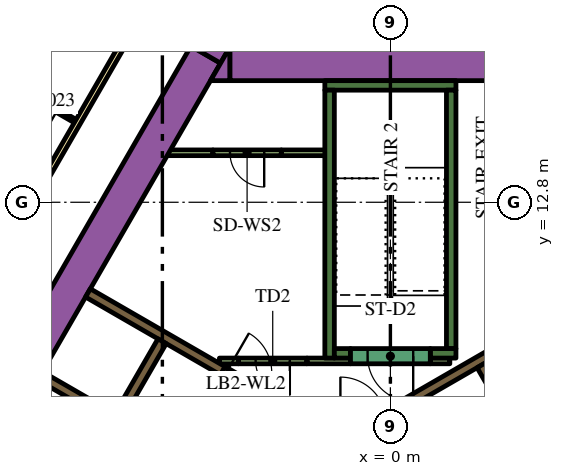
"""IFC4 building model, lengths in metres.
Left out: names, types, materials, properties, quantities, classifications, styles, units other than length and angle.
Written with IfcOpenShell. Run it as: python <this file> out.ifc"""

import sys

from ifc_helpers import new_model, si_unit, direction, frame, frame_2d, origin, place, context, subcontext, project, spatial, polyline, rectangle, outline, extrude, element, fill, save


model = new_model("IFC4")
c1 = context("Model", 3, precision=1e-05, world=origin(), true_north=direction((0.0, 1.0)))
c2 = subcontext(c1, "Body", "Model", "MODEL_VIEW")
j1 = project(units=[si_unit("LENGTHUNIT", "METRE"), si_unit("PLANEANGLEUNIT", "RADIAN")], contexts=[c1])
p1 = place(None, origin())
s1 = spatial("IfcSite", under=j1, at=p1, CompositionType="ELEMENT")
p2 = place(p1, origin())
s2 = spatial("IfcBuilding", under=s1, at=p2, CompositionType="ELEMENT")
p3 = place(p2, frame((0.0, 0.0, 130.5)))
s3 = spatial("IfcBuildingStorey", under=s2, at=p3, CompositionType="ELEMENT", Elevation=130.5)
p4 = place(p3, frame((-14.268, 0.387, 0.0), z_axis=(0.0, 0.0, 1.0), x_axis=(0.499994617707, 0.866028511231, 0.0)))
e1 = element("IfcWall", 1, at=p4, inside=s3, PredefinedType="SOLIDWALL", context=c2, shape_type="SweptSolid", body=[
    extrude(rectangle(XDim=18.817, YDim=0.9, at=frame_2d((9.409, 0.0))), origin(), (0.0, 0.0, 1.0), 3.9),
])
p5 = place(p3, origin())
e2 = element("IfcWall", 2, at=p5, inside=s3, PredefinedType="SOLIDWALL", context=c2, shape_type="SweptSolid", body=[
    extrude(outline(polyline([(-4.215, 16.9), (-4.469, 16.46), (-5.231, 16.9), (-4.215, 16.9)])), origin(), (0.0, 0.0, 1.0), 3.9),
])
p6 = place(p3, frame((-4.224, 16.45, 0.0), z_axis=(0.0, 0.0, 1.0), x_axis=(1.0, 0.0, 0.0)))
e3 = element("IfcWall", 3, at=p6, inside=s3, PredefinedType="SOLIDWALL", context=c2, shape_type="SweptSolid", body=[
    extrude(rectangle(XDim=9.488, YDim=0.9, at=frame_2d((4.744, 0.0))), origin(), (0.0, 0.0, 1.0), 3.9),
])
e4 = element("IfcWall", 4, at=p5, inside=s3, PredefinedType="SOLIDWALL", context=c2, shape_type="SweptSolid", body=[
    extrude(outline(polyline([(-4.734, 16.0), (-4.226, 16.88), (-4.226, 16.0), (-4.734, 16.0)])), origin(), (0.0, 0.0, 1.0), 3.9),
])
p7 = place(p3, frame((-1.725, 15.875, 0.0), z_axis=(0.0, 0.0, 1.0), x_axis=(1.0, 0.0, 0.0)))
e5 = element("IfcWall", 5, at=p7, inside=s3, PredefinedType="SOLIDWALL", context=c2, shape_type="SweptSolid", body=[
    extrude(rectangle(XDim=3.45, YDim=0.25, at=frame_2d((1.725, 0.0))), origin(), (0.0, 0.0, 1.0), 3.9),
])
p8 = place(p3, frame((1.6, 8.95, 0.0), z_axis=(0.0, 0.0, 1.0), x_axis=(0.0, 1.0, 0.0)))
e6 = element("IfcWall", 6, at=p8, inside=s3, PredefinedType="SOLIDWALL", context=c2, shape_type="SweptSolid", body=[
    extrude(rectangle(XDim=6.8, YDim=0.25, at=frame_2d((3.4, 0.0))), origin(), (0.0, 0.0, 1.0), 3.9),
])
p9 = place(p3, frame((1.05, 8.825, 0.0), z_axis=(0.0, 0.0, 1.0), x_axis=(1.0, 0.0, 0.0)))
e7 = element("IfcWall", 7, at=p9, inside=s3, PredefinedType="SOLIDWALL", context=c2, shape_type="SweptSolid", body=[
    extrude(rectangle(XDim=0.675, YDim=0.25, at=frame_2d((0.337, 0.0))), origin(), (0.0, 0.0, 1.0), 3.9),
])
p10 = place(p3, frame((-1.6, 8.7, 0.0), z_axis=(0.0, 0.0, 1.0), x_axis=(0.0, 1.0, 0.0)))
e8 = element("IfcWall", 8, at=p10, inside=s3, PredefinedType="SOLIDWALL", context=c2, shape_type="SweptSolid", body=[
    extrude(rectangle(XDim=7.05, YDim=0.25, at=frame_2d((3.525, 0.0))), origin(), (0.0, 0.0, 1.0), 3.9),
])
p11 = place(p3, frame((-1.475, 8.825, 0.0), z_axis=(0.0, 0.0, 1.0), x_axis=(1.0, 0.0, 0.0)))
e9 = element("IfcWall", 9, at=p11, inside=s3, PredefinedType="SOLIDWALL", context=c2, shape_type="SweptSolid", body=[
    extrude(rectangle(XDim=0.425, YDim=0.25, at=frame_2d((0.212, 0.0))), origin(), (0.0, 0.0, 1.0), 3.9),
])
p12 = place(p3, frame((0.314, 7.456, 0.0), z_axis=(0.0, 0.0, 1.0), x_axis=(0.866013897511, 0.50001992892, 0.0)))
e10 = element("IfcWall", 10, at=p12, inside=s3, PredefinedType="SOLIDWALL", context=c2, shape_type="SweptSolid", body=[
    extrude(rectangle(XDim=3.268, YDim=0.25, at=frame_2d((1.634, 0.0))), origin(), (0.0, 0.0, 1.0), 3.9),
])
e11 = element("IfcWall", 11, at=p5, inside=s3, PredefinedType="SOLIDWALL", context=c2, shape_type="SweptSolid", body=[
    extrude(outline(polyline([(-3.128, 7.481), (-3.259, 7.557), (-3.134, 7.773), (-3.003, 7.698), (-3.128, 7.481)])), origin(), (0.0, 0.0, 1.0), 3.9),
])
p13 = place(p3, frame((-7.314, 7.132, 0.0), z_axis=(0.0, 0.0, 1.0), x_axis=(-0.866008176907, 0.50002983664, 0.0)))
e12 = element("IfcWall", 12, at=p13, inside=s3, PredefinedType="SOLIDWALL", context=c2, shape_type="SweptSolid", body=[
    extrude(rectangle(XDim=2.2, YDim=0.25, at=frame_2d((1.1, 0.0))), origin(), (0.0, 0.0, 1.0), 3.9),
])
p14 = place(p3, frame((-7.959, 10.415, 0.0), z_axis=(0.0, 0.0, 1.0), x_axis=(0.866020958405, -0.500007699544, 0.0)))
e13 = element("IfcWall", 13, at=p14, inside=s3, PredefinedType="SOLIDWALL", context=c2, shape_type="SweptSolid", body=[
    extrude(rectangle(XDim=4.1, YDim=0.25, at=frame_2d((2.05, 0.0))), origin(), (0.0, 0.0, 1.0), 3.9),
])
p15 = place(p3, frame((-3.997, 8.625, 0.0), z_axis=(0.0, 0.0, 1.0), x_axis=(-1.0, 0.0, 0.0)))
e14 = element("IfcWall", 14, at=p15, inside=s3, PredefinedType="PARTITIONING", context=c2, shape_type="SweptSolid", body=[
    extrude(rectangle(XDim=0.502, YDim=0.15, at=frame_2d((0.251, 0.0))), origin(), (0.0, 0.0, 1.0), 2.6),
])
p16 = place(p3, frame((-5.851, 14.102, 0.0), z_axis=(0.0, 0.0, 1.0), x_axis=(1.0, 0.0, 0.0)))
e15 = element("IfcWall", 15, at=p16, inside=s3, PredefinedType="PARTITIONING", context=c2, shape_type="SweptSolid", body=[
    extrude(rectangle(XDim=1.18, YDim=0.15, at=frame_2d((0.59, 0.0))), origin(), (0.0, 0.0, 1.0), 2.6),
])
p17 = place(p3, frame((-2.196, 8.625, 0.0), z_axis=(0.0, 0.0, 1.0), x_axis=(1.0, 0.0, 0.0)))
e16 = element("IfcWall", 16, at=p17, inside=s3, PredefinedType="PARTITIONING", context=c2, shape_type="SweptSolid", body=[
    extrude(rectangle(XDim=1.146, YDim=0.15, at=frame_2d((0.573, 0.0))), origin(), (0.0, 0.0, 1.0), 2.6),
])
p18 = place(p3, frame((1.05, 8.625, 0.0), z_axis=(0.0, 0.0, 1.0), x_axis=(1.0, 0.0, 0.0)))
e17 = element("IfcWall", 17, at=p18, inside=s3, PredefinedType="PARTITIONING", context=c2, shape_type="SweptSolid", body=[
    extrude(rectangle(XDim=0.514, YDim=0.15, at=frame_2d((0.257, 0.0))), origin(), (0.0, 0.0, 1.0), 2.6),
])
p19 = place(p3, frame((-2.871, 14.102, 0.0), z_axis=(0.0, 0.0, 1.0), x_axis=(1.0, 0.0, 0.0)))
e18 = element("IfcWall", 18, at=p19, inside=s3, PredefinedType="PARTITIONING", context=c2, shape_type="SweptSolid", body=[
    extrude(rectangle(XDim=1.196, YDim=0.15, at=frame_2d((0.598, 0.0))), origin(), (0.0, 0.0, 1.0), 2.6),
])
p20 = place(p3, frame((8.565, -2.185, 0.0), z_axis=(0.0, 0.0, 1.0), x_axis=(-0.499997954832, 0.866026584559, 0.0)))
e19 = element("IfcWall", 19, at=p20, inside=s3, PredefinedType="SOLIDWALL", context=c2, shape_type="SweptSolid", body=[
    extrude(rectangle(XDim=12.35, YDim=0.25, at=frame_2d((6.175, 0.0))), origin(), (0.0, 0.0, 1.0), 3.9),
])
p21 = place(p20, frame((5.725, 0.0, 0.0)))
e20 = element("IfcOpeningElement", 20, at=p21, cuts=e19, PredefinedType="OPENING", context=c2, shape_type="SweptSolid", body=[
    extrude(rectangle(XDim=0.9, YDim=2.1, at=frame_2d((0.45, 1.05))), frame((0.0, 0.135, 0.0), z_axis=(0.0, -1.0, 0.0), x_axis=(1.0, 0.0, 0.0)), (0.0, 0.0, 1.0), 0.27),
])
p22 = place(p3, frame((-6.008, 9.144, 0.0), z_axis=(0.0, 0.0, 1.0), x_axis=(-0.500006956611, -0.866021387346, 0.0)))
e21 = element("IfcWall", 21, at=p22, inside=s3, PredefinedType="SOLIDWALL", context=c2, shape_type="SweptSolid", body=[
    extrude(rectangle(XDim=9.83, YDim=0.25, at=frame_2d((4.915, 0.0))), origin(), (0.0, 0.0, 1.0), 3.9),
])
p23 = place(p22, frame((6.985, 0.0, 0.0)))
e22 = element("IfcOpeningElement", 22, at=p23, cuts=e21, PredefinedType="OPENING", context=c2, shape_type="SweptSolid", body=[
    extrude(rectangle(XDim=0.9, YDim=2.1, at=frame_2d((0.45, 1.05))), frame((0.0, 0.135, 0.0), z_axis=(0.0, -1.0, 0.0), x_axis=(1.0, 0.0, 0.0)), (0.0, 0.0, 1.0), 0.27),
])
p24 = place(p3, frame((1.05, 8.75, 0.0), z_axis=(0.0, 0.0, 1.0), x_axis=(-1.0, 0.0, 0.0)))
e23 = element("IfcWall", 23, at=p24, inside=s3, PredefinedType="SOLIDWALL", context=c2, shape_type="SweptSolid", body=[
    extrude(rectangle(XDim=2.1, YDim=0.4, at=frame_2d((1.05, 0.0))), origin(), (0.0, 0.0, 1.0), 3.9),
])
p25 = place(p24, frame((0.45, 0.0, 0.0)))
e24 = element("IfcOpeningElement", 24, at=p25, cuts=e23, PredefinedType="OPENING", context=c2, shape_type="SweptSolid", body=[
    extrude(rectangle(XDim=1.2, YDim=2.1, at=frame_2d((0.6, 1.05))), frame((0.0, 0.21, 0.0), z_axis=(0.0, -1.0, 0.0), x_axis=(1.0, 0.0, 0.0)), (0.0, 0.0, 1.0), 0.42),
])
p26 = place(p3, frame((-2.196, 8.625, 0.0), z_axis=(0.0, 0.0, 1.0), x_axis=(-1.0, 0.0, 0.0)))
e25 = element("IfcWall", 25, at=p26, inside=s3, PredefinedType="PARTITIONING", context=c2, shape_type="SweptSolid", body=[
    extrude(rectangle(XDim=1.8, YDim=0.15, at=frame_2d((0.9, 0.0))), origin(), (0.0, 0.0, 1.0), 2.6),
])
p27 = place(p26, frame((0.45, 0.0, 0.0)))
e26 = element("IfcOpeningElement", 26, at=p27, cuts=e25, PredefinedType="OPENING", context=c2, shape_type="SweptSolid", body=[
    extrude(rectangle(XDim=0.9, YDim=2.1, at=frame_2d((0.45, 1.05))), frame((0.0, 0.085, 0.0), z_axis=(0.0, -1.0, 0.0), x_axis=(1.0, 0.0, 0.0)), (0.0, 0.0, 1.0), 0.17),
])
p28 = place(p3, frame((-4.409, 8.365, 0.0), z_axis=(0.0, 0.0, 1.0), x_axis=(0.866034573852, -0.49998411664, 0.0)))
e27 = element("IfcWall", 27, at=p28, inside=s3, PredefinedType="SOLIDWALL", context=c2, shape_type="SweptSolid", body=[
    extrude(rectangle(XDim=1.4, YDim=0.25, at=frame_2d((0.7, 0.0))), origin(), (0.0, 0.0, 1.0), 3.9),
])
p29 = place(p28, frame((0.1, 0.0, 0.0)))
e28 = element("IfcOpeningElement", 28, at=p29, cuts=e27, PredefinedType="OPENING", context=c2, shape_type="SweptSolid", body=[
    extrude(rectangle(XDim=1.2, YDim=2.1, at=frame_2d((0.6, 1.05))), frame((0.0, 0.135, 0.0), z_axis=(0.0, -1.0, 0.0), x_axis=(1.0, 0.0, 0.0)), (0.0, 0.0, 1.0), 0.27),
])
p30 = place(p3, frame((-2.871, 14.102, 0.0), z_axis=(0.0, 0.0, 1.0), x_axis=(-1.0, 0.0, 0.0)))
e29 = element("IfcWall", 29, at=p30, inside=s3, PredefinedType="PARTITIONING", context=c2, shape_type="SweptSolid", body=[
    extrude(rectangle(XDim=1.8, YDim=0.15, at=frame_2d((0.9, 0.0))), origin(), (0.0, 0.0, 1.0), 2.6),
])
p31 = place(p30, frame((0.45, 0.0, 0.0)))
e30 = element("IfcOpeningElement", 30, at=p31, cuts=e29, PredefinedType="OPENING", context=c2, shape_type="SweptSolid", body=[
    extrude(rectangle(XDim=0.9, YDim=2.1, at=frame_2d((0.45, 1.05))), frame((0.0, 0.085, 0.0), z_axis=(0.0, -1.0, 0.0), x_axis=(1.0, 0.0, 0.0)), (0.0, 0.0, 1.0), 0.17),
])
p32 = place(p3, frame((-19.081, -3.9, 0.0), z_axis=(0.0, 0.0, 1.0), x_axis=(0.499998313975, 0.866026377209, 0.0)))
e31 = element("IfcWall", 31, at=p32, inside=s3, PredefinedType="PARTITIONING", context=c2, shape_type="SweptSolid", body=[
    extrude(rectangle(XDim=25.766, YDim=0.15, at=frame_2d((12.883, 0.0))), origin(), (0.0, 0.0, 1.0), 2.6),
])
p33 = place(p32, frame((24.141, 0.0, 0.0)))
e32 = element("IfcOpeningElement", 32, at=p33, cuts=e31, PredefinedType="OPENING", context=c2, shape_type="SweptSolid", body=[
    extrude(rectangle(XDim=1.1, YDim=2.1, at=frame_2d((0.55, 1.05))), frame((0.0, 0.085, 0.0), z_axis=(0.0, -1.0, 0.0), x_axis=(1.0, 0.0, 0.0)), (0.0, 0.0, 1.0), 0.17),
])
p34 = place(p32, frame((13.144, 0.0, 0.0)))
e33 = element("IfcOpeningElement", 33, at=p34, cuts=e31, PredefinedType="OPENING", context=c2, shape_type="SweptSolid", body=[
    extrude(rectangle(XDim=1.0, YDim=2.1, at=frame_2d((0.5, 1.05))), frame((0.0, 0.085, 0.0), z_axis=(0.0, -1.0, 0.0), x_axis=(1.0, 0.0, 0.0)), (0.0, 0.0, 1.0), 0.17),
])
p35 = place(p32, frame((11.593, 0.0, 0.0)))
e34 = element("IfcOpeningElement", 34, at=p35, cuts=e31, PredefinedType="OPENING", context=c2, shape_type="SweptSolid", body=[
    extrude(rectangle(XDim=1.1, YDim=2.1, at=frame_2d((0.55, 1.05))), frame((0.0, 0.085, 0.0), z_axis=(0.0, -1.0, 0.0), x_axis=(1.0, 0.0, 0.0)), (0.0, 0.0, 1.0), 0.17),
])
p36 = place(p32, frame((0.596, 0.0, 0.0)))
e35 = element("IfcOpeningElement", 35, at=p36, cuts=e31, PredefinedType="OPENING", context=c2, shape_type="SweptSolid", body=[
    extrude(rectangle(XDim=1.0, YDim=2.1, at=frame_2d((0.5, 1.05))), frame((0.0, 0.085, 0.0), z_axis=(0.0, -1.0, 0.0), x_axis=(1.0, 0.0, 0.0)), (0.0, 0.0, 1.0), 0.17),
])
p37 = place(p3, frame((-8.293, 14.936, 0.0), z_axis=(0.0, 0.0, 1.0), x_axis=(-0.866034573852, 0.49998411664, 0.0)))
e36 = element("IfcWall", 36, at=p37, inside=s3, PredefinedType="PARTITIONING", context=c2, shape_type="SweptSolid", body=[
    extrude(rectangle(XDim=2.8, YDim=0.1, at=frame_2d((1.4, 0.0))), origin(), (0.0, 0.0, 1.0), 2.6),
])
p38 = place(p37, frame((0.55, 0.0, 0.0)))
e37 = element("IfcOpeningElement", 37, at=p38, cuts=e36, PredefinedType="OPENING", context=c2, shape_type="SweptSolid", body=[
    extrude(rectangle(XDim=1.0, YDim=2.1, at=frame_2d((0.5, 1.05))), frame((0.0, 0.06, 0.0), z_axis=(0.0, -1.0, 0.0), x_axis=(1.0, 0.0, 0.0)), (0.0, 0.0, 1.0), 0.12),
])
p39 = place(p25, origin())
e38 = element("IfcDoor", 38, at=p39, inside=s3, OperationType="SINGLE_SWING_LEFT", PredefinedType="DOOR", context=c2, shape_type="SweptSolid", body=[
    extrude(rectangle(XDim=1.2, YDim=2.1, at=frame_2d((0.6, 1.05))), frame((0.0, 0.025, 0.0), z_axis=(0.0, -1.0, 0.0), x_axis=(1.0, 0.0, 0.0)), (0.0, 0.0, 1.0), 0.05),
])
fill(e24, e38)
p40 = place(p27, origin())
e39 = element("IfcDoor", 39, at=p40, inside=s3, OperationType="SINGLE_SWING_LEFT", PredefinedType="DOOR", context=c2, shape_type="SweptSolid", body=[
    extrude(rectangle(XDim=0.9, YDim=2.1, at=frame_2d((0.45, 1.05))), frame((0.0, 0.025, 0.0), z_axis=(0.0, -1.0, 0.0), x_axis=(1.0, 0.0, 0.0)), (0.0, 0.0, 1.0), 0.05),
])
fill(e26, e39)
p41 = place(p29, origin())
e40 = element("IfcDoor", 40, at=p41, inside=s3, OperationType="SINGLE_SWING_LEFT", PredefinedType="DOOR", context=c2, shape_type="SweptSolid", body=[
    extrude(rectangle(XDim=1.2, YDim=2.1, at=frame_2d((0.6, 1.05))), frame((0.0, 0.025, 0.0), z_axis=(0.0, -1.0, 0.0), x_axis=(1.0, 0.0, 0.0)), (0.0, 0.0, 1.0), 0.05),
])
fill(e28, e40)
p42 = place(p31, origin())
e41 = element("IfcDoor", 41, at=p42, inside=s3, OperationType="SINGLE_SWING_LEFT", PredefinedType="DOOR", context=c2, shape_type="SweptSolid", body=[
    extrude(rectangle(XDim=0.9, YDim=2.1, at=frame_2d((0.45, 1.05))), frame((0.0, 0.025, 0.0), z_axis=(0.0, -1.0, 0.0), x_axis=(1.0, 0.0, 0.0)), (0.0, 0.0, 1.0), 0.05),
])
fill(e30, e41)
p43 = place(p38, origin())
e42 = element("IfcDoor", 42, at=p43, inside=s3, OperationType="SINGLE_SWING_RIGHT", PredefinedType="DOOR", context=c2, shape_type="SweptSolid", body=[
    extrude(rectangle(XDim=1.0, YDim=2.1, at=frame_2d((0.5, 1.05))), frame((0.0, 0.025, 0.0), z_axis=(0.0, -1.0, 0.0), x_axis=(1.0, 0.0, 0.0)), (0.0, 0.0, 1.0), 0.05),
])
fill(e37, e42)
save(model, sys.argv[1])
